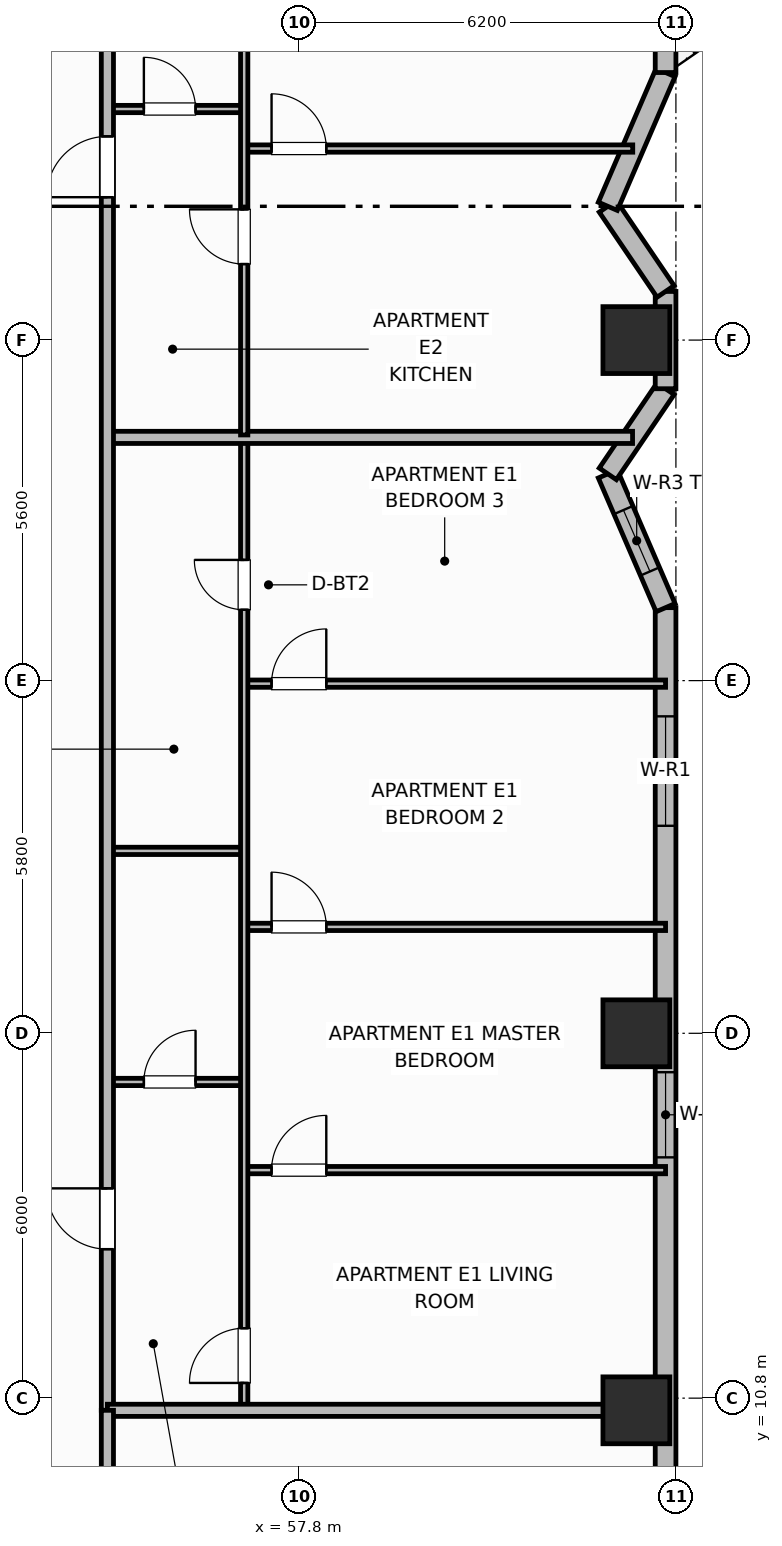
"""IFC4 building model, lengths in metres.
Left out: names, types, materials, properties, quantities, classifications, styles, units other than length and angle.
Written with IfcOpenShell. Run it as: python <this file> out.ifc"""

import sys

from ifc_helpers import new_model, si_unit, direction, frame, frame_2d, origin, origin_2d, place, context, subcontext, project, spatial, rectangle, extrude, element, fill, save


model = new_model("IFC4")
c1 = context("Model", 3, precision=1e-05, world=origin(), true_north=direction((0.0, 1.0)))
c2 = subcontext(c1, "Body", "Model", "MODEL_VIEW")
j1 = project(units=[si_unit("LENGTHUNIT", "METRE"), si_unit("PLANEANGLEUNIT", "RADIAN")], contexts=[c1])
p1 = place(None, origin())
s1 = spatial("IfcSite", under=j1, at=p1, CompositionType="ELEMENT")
p2 = place(p1, origin())
s2 = spatial("IfcBuilding", under=s1, at=p2, CompositionType="ELEMENT")
p3 = place(p2, frame((0.0, 0.0, 99.4)))
s3 = spatial("IfcBuildingStorey", under=s2, at=p3, CompositionType="ELEMENT", Elevation=99.4)
for number, where, z_axis, x_axis in (
    (1, (63.35, 10.6, 0.0), (0.0, 0.0, 1.0), (1.0, 0.0, 0.0)),
    (2, (63.35, 16.8, 0.0), (0.0, 0.0, 1.0), (1.0, 0.0, 0.0)),
    (3, (63.35, 28.2, 0.0), (0.0, 0.0, 1.0), (1.0, 0.0, 0.0)),
):
    element("IfcColumn", number, at=place(p3, frame(where, z_axis=z_axis, x_axis=x_axis)), inside=s3, PredefinedType="COLUMN", context=c2, shape_type="SweptSolid", body=[
        extrude(rectangle(XDim=1.1, YDim=1.1, at=origin_2d()), origin(), (0.0, 0.0, 1.0), 3.7),
    ])
p4 = place(p3, frame((63.83, 9.0, 0.0), z_axis=(0.0, 0.0, 1.0), x_axis=(0.0, 1.0, 0.0)))
e4 = element("IfcWall", 4, at=p4, inside=s3, PredefinedType="SOLIDWALL", context=c2, shape_type="SweptSolid", body=[
    extrude(rectangle(XDim=14.8, YDim=0.34, at=frame_2d((7.4, 0.0))), origin(), (0.0, 0.0, 1.0), 2.7),
])
p5 = place(p4, frame((5.76, 0.0, 0.69)))
e5 = element("IfcOpeningElement", 5, at=p5, cuts=e4, PredefinedType="OPENING", context=c2, shape_type="SweptSolid", body=[
    extrude(rectangle(XDim=1.4, YDim=1.85, at=frame_2d((0.7, 0.925))), frame((0.0, 0.18, 0.0), z_axis=(0.0, -1.0, 0.0), x_axis=(1.0, 0.0, 0.0)), (0.0, 0.0, 1.0), 0.36),
])
p6 = place(p4, frame((11.212, 0.0, 0.73)))
e6 = element("IfcOpeningElement", 6, at=p6, cuts=e4, PredefinedType="OPENING", context=c2, shape_type="SweptSolid", body=[
    extrude(rectangle(XDim=1.8, YDim=1.85, at=frame_2d((0.9, 0.925))), frame((0.0, 0.18, 0.0), z_axis=(0.0, -1.0, 0.0), x_axis=(1.0, 0.0, 0.0)), (0.0, 0.0, 1.0), 0.36),
])
p7 = place(p3, frame((63.83, 23.8, 0.0), z_axis=(0.0, 0.0, 1.0), x_axis=(-0.396512124623, 0.918029484835, 0.0)))
e7 = element("IfcWall", 7, at=p7, inside=s3, PredefinedType="SOLIDWALL", context=c2, shape_type="SweptSolid", body=[
    extrude(rectangle(XDim=2.396, YDim=0.34, at=frame_2d((1.198, 0.0))), origin(), (0.0, 0.0, 1.0), 2.7),
])
p8 = place(p7, frame((0.648, 0.0, 0.89)))
e8 = element("IfcOpeningElement", 8, at=p8, cuts=e7, PredefinedType="OPENING", context=c2, shape_type="SweptSolid", body=[
    extrude(rectangle(XDim=1.1, YDim=1.65, at=frame_2d((0.55, 0.825))), frame((0.0, 0.18, 0.0), z_axis=(0.0, -1.0, 0.0), x_axis=(1.0, 0.0, 0.0)), (0.0, 0.0, 1.0), 0.36),
])
p9 = place(p3, frame((62.88, 26.0, 0.0), z_axis=(0.0, 0.0, 1.0), x_axis=(0.561607274182, 0.827403933751, 0.0)))
e9 = element("IfcWall", 9, at=p9, inside=s3, PredefinedType="SOLIDWALL", context=c2, shape_type="SweptSolid", body=[
    extrude(rectangle(XDim=1.692, YDim=0.34, at=frame_2d((0.846, 0.0))), origin(), (0.0, 0.0, 1.0), 2.7),
])
p10 = place(p3, frame((63.83, 27.4, 0.0), z_axis=(0.0, 0.0, 1.0), x_axis=(0.0, 1.0, 0.0)))
e10 = element("IfcWall", 10, at=p10, inside=s3, PredefinedType="SOLIDWALL", context=c2, shape_type="SweptSolid", body=[
    extrude(rectangle(XDim=1.6, YDim=0.34, at=frame_2d((0.8, 0.0))), origin(), (0.0, 0.0, 1.0), 2.7),
])
p11 = place(p3, frame((63.83, 29.0, 0.0), z_axis=(0.0, 0.0, 1.0), x_axis=(-0.561607274182, 0.827403933751, 0.0)))
e11 = element("IfcWall", 11, at=p11, inside=s3, PredefinedType="SOLIDWALL", context=c2, shape_type="SweptSolid", body=[
    extrude(rectangle(XDim=1.692, YDim=0.34, at=frame_2d((0.846, 0.0))), origin(), (0.0, 0.0, 1.0), 2.7),
])
p12 = place(p3, frame((62.88, 30.4, 0.0), z_axis=(0.0, 0.0, 1.0), x_axis=(0.396475042899, 0.918045500157, 0.0)))
e12 = element("IfcWall", 12, at=p12, inside=s3, PredefinedType="SOLIDWALL", context=c2, shape_type="SweptSolid", body=[
    extrude(rectangle(XDim=2.397, YDim=0.34, at=frame_2d((1.198, 0.0))), origin(), (0.0, 0.0, 1.0), 2.7),
])
p13 = place(p3, frame((63.83, 32.6, 0.0), z_axis=(0.0, 0.0, 1.0), x_axis=(0.0, 1.0, 0.0)))
e13 = element("IfcWall", 13, at=p13, inside=s3, PredefinedType="SOLIDWALL", context=c2, shape_type="SweptSolid", body=[
    extrude(rectangle(XDim=14.8, YDim=0.34, at=frame_2d((7.4, 0.0))), origin(), (0.0, 0.0, 1.0), 2.7),
])
p14 = place(p13, frame((1.7, 0.0, 0.0)))
e14 = element("IfcOpeningElement", 14, at=p14, cuts=e13, PredefinedType="OPENING", context=c2, shape_type="SweptSolid", body=[
    extrude(rectangle(XDim=1.6, YDim=2.1, at=frame_2d((0.8, 1.05))), frame((0.0, 0.18, 0.0), z_axis=(0.0, -1.0, 0.0), x_axis=(1.0, 0.0, 0.0)), (0.0, 0.0, 1.0), 0.36),
])
p15 = place(p13, frame((5.0, 0.0, 0.69)))
e15 = element("IfcOpeningElement", 15, at=p15, cuts=e13, PredefinedType="OPENING", context=c2, shape_type="SweptSolid", body=[
    extrude(rectangle(XDim=1.4, YDim=1.85, at=frame_2d((0.7, 0.925))), frame((0.0, 0.18, 0.0), z_axis=(0.0, -1.0, 0.0), x_axis=(1.0, 0.0, 0.0)), (0.0, 0.0, 1.0), 0.36),
])
p16 = place(p13, frame((8.988, 0.0, 0.68)))
e16 = element("IfcOpeningElement", 16, at=p16, cuts=e13, PredefinedType="OPENING", context=c2, shape_type="SweptSolid", body=[
    extrude(rectangle(XDim=1.6, YDim=1.9, at=frame_2d((0.8, 0.95))), frame((0.0, 0.18, 0.0), z_axis=(0.0, -1.0, 0.0), x_axis=(1.0, 0.0, 0.0)), (0.0, 0.0, 1.0), 0.36),
])
p17 = place(p3, frame((54.65, 16.0, 0.0), z_axis=(0.0, 0.0, 1.0), x_axis=(1.0, 0.0, 0.0)))
e17 = element("IfcWall", 17, at=p17, inside=s3, PredefinedType="PARTITIONING", context=c2, shape_type="SweptSolid", body=[
    extrude(rectangle(XDim=2.25, YDim=0.12, at=frame_2d((1.125, 0.0))), origin(), (0.0, 0.0, 1.0), 2.53),
])
p18 = place(p17, frame((0.6, 0.0, 0.0)))
e18 = element("IfcOpeningElement", 18, at=p18, cuts=e17, PredefinedType="OPENING", context=c2, shape_type="SweptSolid", body=[
    extrude(rectangle(XDim=0.85, YDim=2.1, at=frame_2d((0.425, 1.05))), frame((0.0, 0.07, 0.0), z_axis=(0.0, -1.0, 0.0), x_axis=(1.0, 0.0, 0.0)), (0.0, 0.0, 1.0), 0.14),
])
p19 = place(p3, frame((54.65, 19.8, 0.0), z_axis=(0.0, 0.0, 1.0), x_axis=(1.0, 0.0, 0.0)))
e19 = element("IfcWall", 19, at=p19, inside=s3, PredefinedType="PARTITIONING", context=c2, shape_type="SweptSolid", body=[
    extrude(rectangle(XDim=2.25, YDim=0.12, at=frame_2d((1.125, 0.0))), origin(), (0.0, 0.0, 1.0), 2.53),
])
p20 = place(p3, frame((56.9, 14.55, 0.0), z_axis=(0.0, 0.0, 1.0), x_axis=(1.0, 0.0, 0.0)))
e20 = element("IfcWall", 20, at=p20, inside=s3, PredefinedType="PARTITIONING", context=c2, shape_type="SweptSolid", body=[
    extrude(rectangle(XDim=6.93, YDim=0.12, at=frame_2d((3.465, 0.0))), origin(), (0.0, 0.0, 1.0), 2.53),
])
p21 = place(p20, frame((0.45, 0.0, 0.0)))
e21 = element("IfcOpeningElement", 21, at=p21, cuts=e20, PredefinedType="OPENING", context=c2, shape_type="SweptSolid", body=[
    extrude(rectangle(XDim=0.9, YDim=2.1, at=frame_2d((0.45, 1.05))), frame((0.0, 0.07, 0.0), z_axis=(0.0, -1.0, 0.0), x_axis=(1.0, 0.0, 0.0)), (0.0, 0.0, 1.0), 0.14),
])
p22 = place(p3, frame((56.9, 18.55, 0.0), z_axis=(0.0, 0.0, 1.0), x_axis=(1.0, 0.0, 0.0)))
e22 = element("IfcWall", 22, at=p22, inside=s3, PredefinedType="PARTITIONING", context=c2, shape_type="SweptSolid", body=[
    extrude(rectangle(XDim=6.93, YDim=0.12, at=frame_2d((3.465, 0.0))), origin(), (0.0, 0.0, 1.0), 2.53),
])
p23 = place(p22, frame((0.45, 0.0, 0.0)))
e23 = element("IfcOpeningElement", 23, at=p23, cuts=e22, PredefinedType="OPENING", context=c2, shape_type="SweptSolid", body=[
    extrude(rectangle(XDim=0.9, YDim=2.1, at=frame_2d((0.45, 1.05))), frame((0.0, 0.07, 0.0), z_axis=(0.0, -1.0, 0.0), x_axis=(1.0, 0.0, 0.0)), (0.0, 0.0, 1.0), 0.14),
])
p24 = place(p3, frame((56.9, 22.55, 0.0), z_axis=(0.0, 0.0, 1.0), x_axis=(1.0, 0.0, 0.0)))
e24 = element("IfcWall", 24, at=p24, inside=s3, PredefinedType="PARTITIONING", context=c2, shape_type="SweptSolid", body=[
    extrude(rectangle(XDim=6.93, YDim=0.12, at=frame_2d((3.465, 0.0))), origin(), (0.0, 0.0, 1.0), 2.53),
])
p25 = place(p24, frame((0.45, 0.0, 0.0)))
e25 = element("IfcOpeningElement", 25, at=p25, cuts=e24, PredefinedType="OPENING", context=c2, shape_type="SweptSolid", body=[
    extrude(rectangle(XDim=0.9, YDim=2.1, at=frame_2d((0.45, 1.05))), frame((0.0, 0.07, 0.0), z_axis=(0.0, -1.0, 0.0), x_axis=(1.0, 0.0, 0.0)), (0.0, 0.0, 1.0), 0.14),
])
p26 = place(p3, frame((56.9, 10.64, 0.0), z_axis=(0.0, 0.0, 1.0), x_axis=(0.0, 1.0, 0.0)))
e26 = element("IfcWall", 26, at=p26, inside=s3, PredefinedType="PARTITIONING", context=c2, shape_type="SweptSolid", body=[
    extrude(rectangle(XDim=15.92, YDim=0.12, at=frame_2d((7.96, 0.0))), origin(), (0.0, 0.0, 1.0), 2.53),
])
p27 = place(p26, frame((0.41, 0.0, 0.0)))
e27 = element("IfcOpeningElement", 27, at=p27, cuts=e26, PredefinedType="OPENING", context=c2, shape_type="SweptSolid", body=[
    extrude(rectangle(XDim=0.9, YDim=2.1, at=frame_2d((0.45, 1.05))), frame((0.0, 0.07, 0.0), z_axis=(0.0, -1.0, 0.0), x_axis=(1.0, 0.0, 0.0)), (0.0, 0.0, 1.0), 0.14),
])
p28 = place(p26, frame((13.125, 0.0, 0.0)))
e28 = element("IfcOpeningElement", 28, at=p28, cuts=e26, PredefinedType="OPENING", context=c2, shape_type="SweptSolid", body=[
    extrude(rectangle(XDim=0.82, YDim=2.08, at=frame_2d((0.41, 1.04))), frame((0.0, 0.07, 0.0), z_axis=(0.0, -1.0, 0.0), x_axis=(1.0, 0.0, 0.0)), (0.0, 0.0, 1.0), 0.14),
])
p29 = place(p3, frame((54.65, 26.6, 0.0), z_axis=(0.0, 0.0, 1.0), x_axis=(1.0, 0.0, 0.0)))
e29 = element("IfcWall", 29, at=p29, inside=s3, PredefinedType="PARTITIONING", context=c2, shape_type="SweptSolid", body=[
    extrude(rectangle(XDim=8.637, YDim=0.2, at=frame_2d((4.319, 0.0))), origin(), (0.0, 0.0, 1.0), 2.53),
])
p30 = place(p3, frame((54.65, 32.0, 0.0), z_axis=(0.0, 0.0, 1.0), x_axis=(1.0, 0.0, 0.0)))
e30 = element("IfcWall", 30, at=p30, inside=s3, PredefinedType="PARTITIONING", context=c2, shape_type="SweptSolid", body=[
    extrude(rectangle(XDim=2.25, YDim=0.12, at=frame_2d((1.125, 0.0))), origin(), (0.0, 0.0, 1.0), 2.53),
])
p31 = place(p30, frame((0.6, 0.0, 0.0)))
e31 = element("IfcOpeningElement", 31, at=p31, cuts=e30, PredefinedType="OPENING", context=c2, shape_type="SweptSolid", body=[
    extrude(rectangle(XDim=0.85, YDim=2.1, at=frame_2d((0.425, 1.05))), frame((0.0, 0.07, 0.0), z_axis=(0.0, -1.0, 0.0), x_axis=(1.0, 0.0, 0.0)), (0.0, 0.0, 1.0), 0.14),
])
p32 = place(p3, frame((56.9, 31.35, 0.0), z_axis=(0.0, 0.0, 1.0), x_axis=(1.0, 0.0, 0.0)))
e32 = element("IfcWall", 32, at=p32, inside=s3, PredefinedType="PARTITIONING", context=c2, shape_type="SweptSolid", body=[
    extrude(rectangle(XDim=6.39, YDim=0.12, at=frame_2d((3.195, 0.0))), origin(), (0.0, 0.0, 1.0), 2.53),
])
p33 = place(p32, frame((0.45, 0.0, 0.0)))
e33 = element("IfcOpeningElement", 33, at=p33, cuts=e32, PredefinedType="OPENING", context=c2, shape_type="SweptSolid", body=[
    extrude(rectangle(XDim=0.9, YDim=2.1, at=frame_2d((0.45, 1.05))), frame((0.0, 0.07, 0.0), z_axis=(0.0, -1.0, 0.0), x_axis=(1.0, 0.0, 0.0)), (0.0, 0.0, 1.0), 0.14),
])
p34 = place(p3, frame((56.9, 26.64, 0.0), z_axis=(0.0, 0.0, 1.0), x_axis=(0.0, 1.0, 0.0)))
e34 = element("IfcWall", 34, at=p34, inside=s3, PredefinedType="PARTITIONING", context=c2, shape_type="SweptSolid", body=[
    extrude(rectangle(XDim=19.12, YDim=0.12, at=frame_2d((9.56, 0.0))), origin(), (0.0, 0.0, 1.0), 2.53),
])
p35 = place(p34, frame((2.81, 0.0, 0.0)))
e35 = element("IfcOpeningElement", 35, at=p35, cuts=e34, PredefinedType="OPENING", context=c2, shape_type="SweptSolid", body=[
    extrude(rectangle(XDim=0.9, YDim=2.1, at=frame_2d((0.45, 1.05))), frame((0.0, 0.07, 0.0), z_axis=(0.0, -1.0, 0.0), x_axis=(1.0, 0.0, 0.0)), (0.0, 0.0, 1.0), 0.14),
])
p36 = place(p34, frame((16.18, 0.0, 0.0)))
e36 = element("IfcOpeningElement", 36, at=p36, cuts=e34, PredefinedType="OPENING", context=c2, shape_type="SweptSolid", body=[
    extrude(rectangle(XDim=0.82, YDim=2.08, at=frame_2d((0.41, 1.04))), frame((0.0, 0.07, 0.0), z_axis=(0.0, -1.0, 0.0), x_axis=(1.0, 0.0, 0.0)), (0.0, 0.0, 1.0), 0.14),
])
p37 = place(p3, frame((54.65, 10.6, 0.0), z_axis=(0.0, 0.0, 1.0), x_axis=(0.0, 1.0, 0.0)))
e37 = element("IfcWall", 37, at=p37, inside=s3, PredefinedType="PARTITIONING", context=c2, shape_type="SweptSolid", body=[
    extrude(rectangle(XDim=35.2, YDim=0.2, at=frame_2d((17.6, 0.0))), origin(), (0.0, 0.0, 1.0), 2.53),
])
p38 = place(p37, frame((2.65, 0.0, 0.0)))
e38 = element("IfcOpeningElement", 38, at=p38, cuts=e37, PredefinedType="OPENING", context=c2, shape_type="SweptSolid", body=[
    extrude(rectangle(XDim=1.0, YDim=2.15, at=frame_2d((0.5, 1.075))), frame((0.0, 0.11, 0.0), z_axis=(0.0, -1.0, 0.0), x_axis=(1.0, 0.0, 0.0)), (0.0, 0.0, 1.0), 0.22),
])
p39 = place(p37, frame((19.95, 0.0, 0.0)))
e39 = element("IfcOpeningElement", 39, at=p39, cuts=e37, PredefinedType="OPENING", context=c2, shape_type="SweptSolid", body=[
    extrude(rectangle(XDim=1.0, YDim=2.15, at=frame_2d((0.5, 1.075))), frame((0.0, 0.11, 0.0), z_axis=(0.0, -1.0, 0.0), x_axis=(1.0, 0.0, 0.0)), (0.0, 0.0, 1.0), 0.22),
])
p40 = place(p3, frame((54.65, 10.6, 0.0), z_axis=(0.0, 0.0, 1.0), x_axis=(1.0, 0.0, 0.0)))
e40 = element("IfcWall", 40, at=p40, inside=s3, PredefinedType="PARTITIONING", context=c2, shape_type="SweptSolid", body=[
    extrude(rectangle(XDim=8.76, YDim=0.2, at=frame_2d((4.38, 0.0))), origin(), (0.0, 0.0, 1.0), 2.53),
])
p41 = place(p3, frame((54.65, 4.97, 0.0), z_axis=(0.0, 0.0, 1.0), x_axis=(0.0, 1.0, 0.0)))
e41 = element("IfcWall", 41, at=p41, inside=s3, PredefinedType="PARTITIONING", context=c2, shape_type="SweptSolid", body=[
    extrude(rectangle(XDim=5.63, YDim=0.2, at=frame_2d((2.815, 0.0))), origin(), (0.0, 0.0, 1.0), 2.53),
])
p42 = place(p5, origin())
e42 = element("IfcWindow", 42, at=p42, inside=s3, PartitioningType="SINGLE_PANEL", PredefinedType="WINDOW", context=c2, shape_type="SweptSolid", body=[
    extrude(rectangle(XDim=1.4, YDim=1.85, at=frame_2d((0.7, 0.925))), frame((0.0, 0.03, 0.0), z_axis=(0.0, -1.0, 0.0), x_axis=(1.0, 0.0, 0.0)), (0.0, 0.0, 1.0), 0.06),
])
fill(e5, e42)
p43 = place(p6, origin())
e43 = element("IfcWindow", 43, at=p43, inside=s3, PartitioningType="SINGLE_PANEL", PredefinedType="WINDOW", context=c2, shape_type="SweptSolid", body=[
    extrude(rectangle(XDim=1.8, YDim=1.85, at=frame_2d((0.9, 0.925))), frame((0.0, 0.03, 0.0), z_axis=(0.0, -1.0, 0.0), x_axis=(1.0, 0.0, 0.0)), (0.0, 0.0, 1.0), 0.06),
])
fill(e6, e43)
p44 = place(p8, origin())
e44 = element("IfcWindow", 44, at=p44, inside=s3, PartitioningType="SINGLE_PANEL", PredefinedType="WINDOW", context=c2, shape_type="SweptSolid", body=[
    extrude(rectangle(XDim=1.1, YDim=1.65, at=frame_2d((0.55, 0.825))), frame((0.0, 0.03, 0.0), z_axis=(0.0, -1.0, 0.0), x_axis=(1.0, 0.0, 0.0)), (0.0, 0.0, 1.0), 0.06),
])
fill(e8, e44)
p45 = place(p18, origin())
e45 = element("IfcDoor", 45, at=p45, inside=s3, OperationType="SINGLE_SWING_RIGHT", PredefinedType="DOOR", context=c2, shape_type="SweptSolid", body=[
    extrude(rectangle(XDim=0.85, YDim=2.1, at=frame_2d((0.425, 1.05))), frame((0.0, 0.025, 0.0), z_axis=(0.0, -1.0, 0.0), x_axis=(1.0, 0.0, 0.0)), (0.0, 0.0, 1.0), 0.05),
])
fill(e18, e45)
p46 = place(p21, origin())
e46 = element("IfcDoor", 46, at=p46, inside=s3, OperationType="SINGLE_SWING_RIGHT", PredefinedType="DOOR", context=c2, shape_type="SweptSolid", body=[
    extrude(rectangle(XDim=0.9, YDim=2.1, at=frame_2d((0.45, 1.05))), frame((0.0, 0.025, 0.0), z_axis=(0.0, -1.0, 0.0), x_axis=(1.0, 0.0, 0.0)), (0.0, 0.0, 1.0), 0.05),
])
fill(e21, e46)
p47 = place(p23, origin())
e47 = element("IfcDoor", 47, at=p47, inside=s3, OperationType="SINGLE_SWING_LEFT", PredefinedType="DOOR", context=c2, shape_type="SweptSolid", body=[
    extrude(rectangle(XDim=0.9, YDim=2.1, at=frame_2d((0.45, 1.05))), frame((0.0, 0.025, 0.0), z_axis=(0.0, -1.0, 0.0), x_axis=(1.0, 0.0, 0.0)), (0.0, 0.0, 1.0), 0.05),
])
fill(e23, e47)
p48 = place(p25, origin())
e48 = element("IfcDoor", 48, at=p48, inside=s3, OperationType="SINGLE_SWING_RIGHT", PredefinedType="DOOR", context=c2, shape_type="SweptSolid", body=[
    extrude(rectangle(XDim=0.9, YDim=2.1, at=frame_2d((0.45, 1.05))), frame((0.0, 0.025, 0.0), z_axis=(0.0, -1.0, 0.0), x_axis=(1.0, 0.0, 0.0)), (0.0, 0.0, 1.0), 0.05),
])
fill(e25, e48)
p49 = place(p27, origin())
e49 = element("IfcDoor", 49, at=p49, inside=s3, OperationType="SINGLE_SWING_LEFT", PredefinedType="DOOR", context=c2, shape_type="SweptSolid", body=[
    extrude(rectangle(XDim=0.9, YDim=2.1, at=frame_2d((0.45, 1.05))), frame((0.0, 0.025, 0.0), z_axis=(0.0, -1.0, 0.0), x_axis=(1.0, 0.0, 0.0)), (0.0, 0.0, 1.0), 0.05),
])
fill(e27, e49)
p50 = place(p28, origin())
e50 = element("IfcDoor", 50, at=p50, inside=s3, OperationType="SINGLE_SWING_RIGHT", PredefinedType="DOOR", context=c2, shape_type="SweptSolid", body=[
    extrude(rectangle(XDim=0.82, YDim=2.08, at=frame_2d((0.41, 1.04))), frame((0.0, 0.025, 0.0), z_axis=(0.0, -1.0, 0.0), x_axis=(1.0, 0.0, 0.0)), (0.0, 0.0, 1.0), 0.05),
])
fill(e28, e50)
p51 = place(p31, origin())
e51 = element("IfcDoor", 51, at=p51, inside=s3, OperationType="SINGLE_SWING_LEFT", PredefinedType="DOOR", context=c2, shape_type="SweptSolid", body=[
    extrude(rectangle(XDim=0.85, YDim=2.1, at=frame_2d((0.425, 1.05))), frame((0.0, 0.025, 0.0), z_axis=(0.0, -1.0, 0.0), x_axis=(1.0, 0.0, 0.0)), (0.0, 0.0, 1.0), 0.05),
])
fill(e31, e51)
p52 = place(p33, origin())
e52 = element("IfcDoor", 52, at=p52, inside=s3, OperationType="SINGLE_SWING_LEFT", PredefinedType="DOOR", context=c2, shape_type="SweptSolid", body=[
    extrude(rectangle(XDim=0.9, YDim=2.1, at=frame_2d((0.45, 1.05))), frame((0.0, 0.025, 0.0), z_axis=(0.0, -1.0, 0.0), x_axis=(1.0, 0.0, 0.0)), (0.0, 0.0, 1.0), 0.05),
])
fill(e33, e52)
p53 = place(p35, origin())
e53 = element("IfcDoor", 53, at=p53, inside=s3, OperationType="SINGLE_SWING_RIGHT", PredefinedType="DOOR", context=c2, shape_type="SweptSolid", body=[
    extrude(rectangle(XDim=0.9, YDim=2.1, at=frame_2d((0.45, 1.05))), frame((0.0, 0.025, 0.0), z_axis=(0.0, -1.0, 0.0), x_axis=(1.0, 0.0, 0.0)), (0.0, 0.0, 1.0), 0.05),
])
fill(e35, e53)
p54 = place(p38, origin())
e54 = element("IfcDoor", 54, at=p54, inside=s3, OperationType="SINGLE_SWING_RIGHT", PredefinedType="DOOR", context=c2, shape_type="SweptSolid", body=[
    extrude(rectangle(XDim=1.0, YDim=2.15, at=frame_2d((0.5, 1.075))), frame((0.0, 0.025, 0.0), z_axis=(0.0, -1.0, 0.0), x_axis=(1.0, 0.0, 0.0)), (0.0, 0.0, 1.0), 0.05),
])
fill(e38, e54)
p55 = place(p39, origin())
e55 = element("IfcDoor", 55, at=p55, inside=s3, OperationType="SINGLE_SWING_LEFT", PredefinedType="DOOR", context=c2, shape_type="SweptSolid", body=[
    extrude(rectangle(XDim=1.0, YDim=2.15, at=frame_2d((0.5, 1.075))), frame((0.0, 0.025, 0.0), z_axis=(0.0, -1.0, 0.0), x_axis=(1.0, 0.0, 0.0)), (0.0, 0.0, 1.0), 0.05),
])
fill(e39, e55)
save(model, sys.argv[1])
